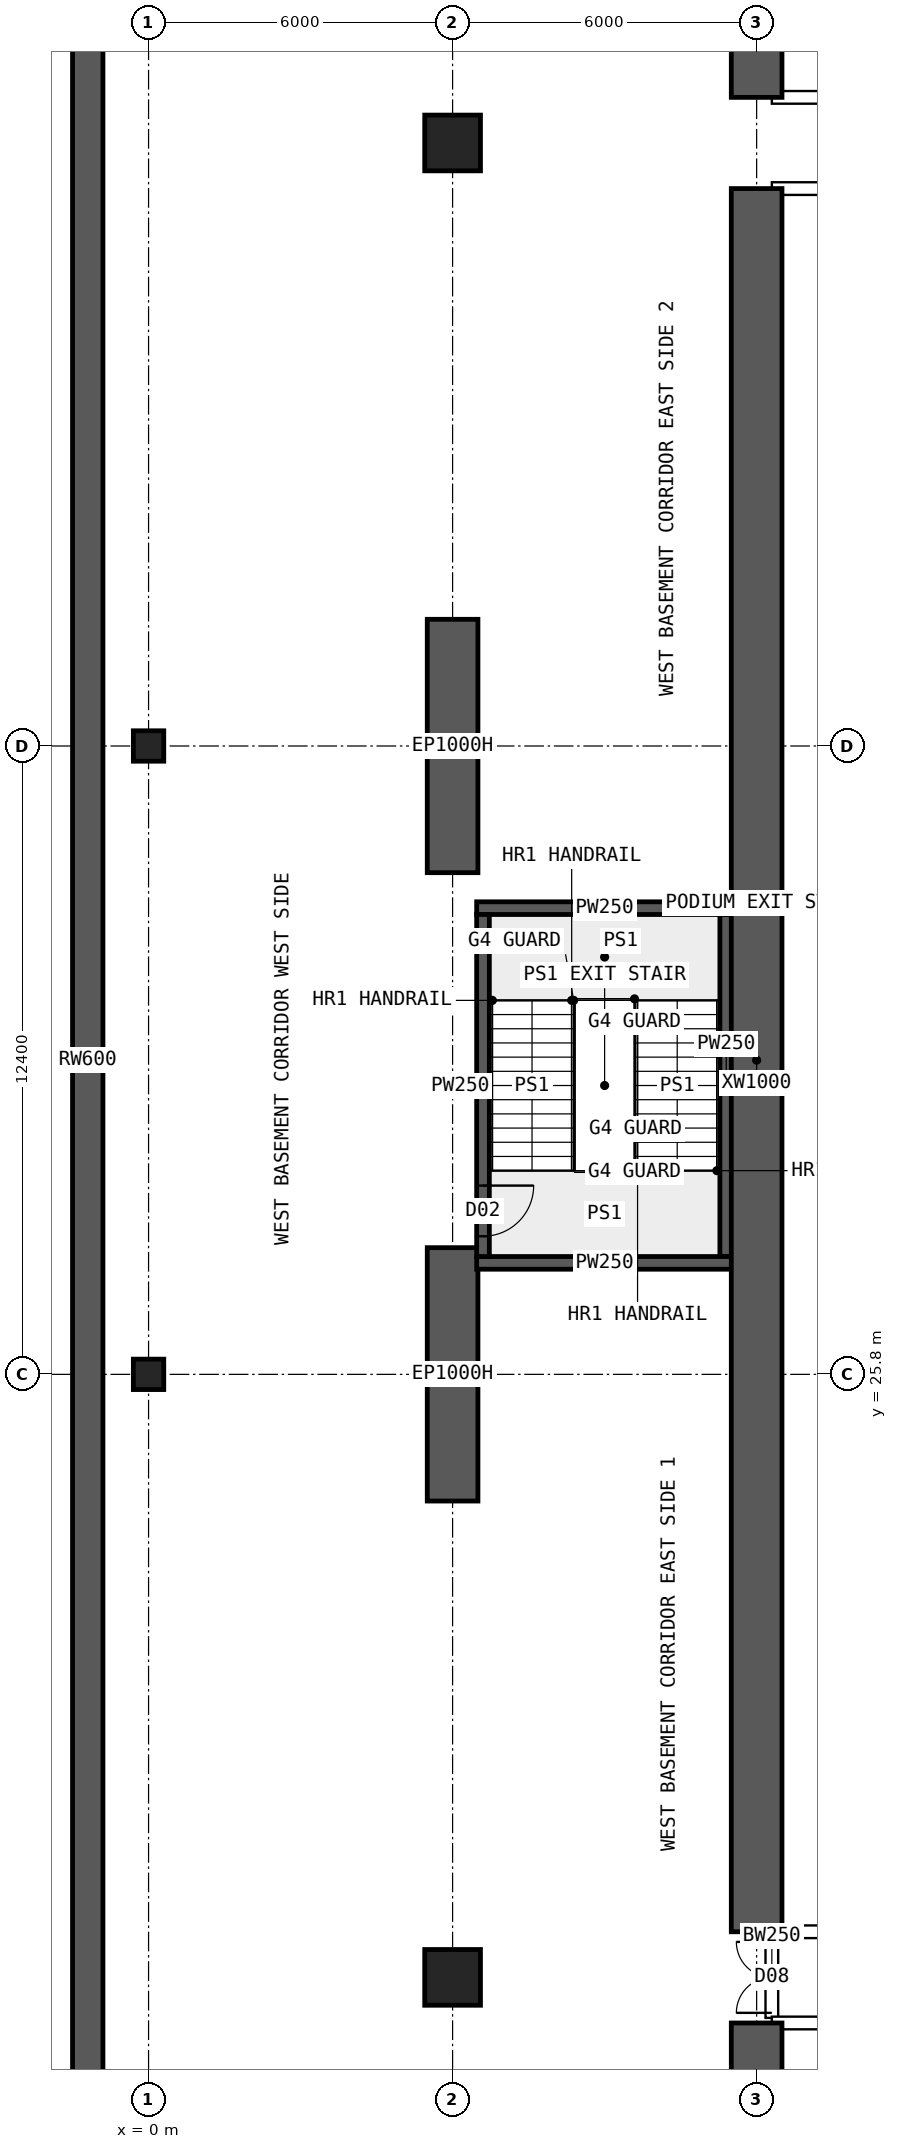
"""IFC4 building model, lengths in metres.
Left out: names, types, materials, properties, quantities, classifications, styles, units other than length and angle.
Written with IfcOpenShell. Run it as: python <this file> out.ifc"""

import sys

from ifc_helpers import new_model, si_unit, direction, frame, frame_2d, origin, origin_2d, place, context, subcontext, project, spatial, polyline, rectangle, hollow_rectangle, outline, extrude, element, fill, save


model = new_model("IFC4")
c1 = context("Model", 3, precision=1e-05, world=origin(), true_north=direction((0.0, 1.0)))
c2 = subcontext(c1, "Body", "Model", "MODEL_VIEW")
j1 = project(units=[si_unit("LENGTHUNIT", "METRE"), si_unit("PLANEANGLEUNIT", "RADIAN")], contexts=[c1])
p1 = place(None, origin())
s1 = spatial("IfcSite", under=j1, at=p1, CompositionType="ELEMENT")
p2 = place(p1, origin())
s2 = spatial("IfcBuilding", under=s1, at=p2, CompositionType="ELEMENT")
p3 = place(p2, frame((0.0, 0.0, -4.5)))
s3 = spatial("IfcBuildingStorey", under=s2, at=p3, CompositionType="ELEMENT", Elevation=-4.5)
for number, where, z_axis, x_axis in (
    (1, (6.0, 23.3, 0.0), (0.0, 0.0, 1.0), (0.0, 1.0, 0.0)),
    (2, (6.0, 35.7, 0.0), (0.0, 0.0, 1.0), (0.0, 1.0, 0.0)),
):
    element("IfcWall", number, at=place(p3, frame(where, z_axis=z_axis, x_axis=x_axis)), inside=s3, PredefinedType="SHEAR", context=c2, shape_type="SweptSolid", body=[
        extrude(rectangle(XDim=5.0, YDim=1.0, at=frame_2d((2.5, 0.0))), origin(), (0.0, 0.0, 1.0), 4.5),
    ])
for number, where, z_axis, x_axis in (
    (3, (6.0, 13.9, 0.0), (0.0, 0.0, 1.0), (1.0, 0.0, 0.0)),
    (4, (6.0, 50.1, 0.0), (0.0, 0.0, 1.0), (1.0, 0.0, 0.0)),
):
    element("IfcColumn", number, at=place(p3, frame(where, z_axis=z_axis, x_axis=x_axis)), inside=s3, PredefinedType="COLUMN", context=c2, shape_type="SweptSolid", body=[
        extrude(hollow_rectangle(XDim=1.1, YDim=1.1, WallThickness=0.11, at=origin_2d()), origin(), (0.0, 0.0, 1.0), 4.5),
    ])
for number, where, z_axis, x_axis in (
    (5, (0.0, 25.8, 0.0), (0.0, 0.0, 1.0), (1.0, 0.0, 0.0)),
    (6, (0.0, 38.2, 0.0), (0.0, 0.0, 1.0), (1.0, 0.0, 0.0)),
):
    element("IfcColumn", number, at=place(p3, frame(where, z_axis=z_axis, x_axis=x_axis)), inside=s3, PredefinedType="COLUMN", context=c2, shape_type="SweptSolid", body=[
        extrude(hollow_rectangle(XDim=0.6, YDim=0.6, WallThickness=0.06, at=origin_2d()), origin(), (0.0, 0.0, 1.0), 4.5),
    ])
p4 = place(p3, frame((6.475, 28.0, 0.0), z_axis=(0.0, 0.0, 1.0), x_axis=(1.0, 0.0, 0.0)))
e7 = element("IfcWall", 7, at=p4, inside=s3, PredefinedType="SHEAR", context=c2, shape_type="SweptSolid", body=[
    extrude(rectangle(XDim=5.05, YDim=0.25, at=frame_2d((2.525, 0.0))), origin(), (0.0, 0.0, 1.0), 4.5),
])
p5 = place(p3, frame((11.4, 28.125, 0.0), z_axis=(0.0, 0.0, 1.0), x_axis=(0.0, 1.0, 0.0)))
e8 = element("IfcWall", 8, at=p5, inside=s3, PredefinedType="SHEAR", context=c2, shape_type="SweptSolid", body=[
    extrude(rectangle(XDim=6.75, YDim=0.25, at=frame_2d((3.375, 0.0))), origin(), (0.0, 0.0, 1.0), 4.5),
])
p6 = place(p3, frame((11.525, 35.0, 0.0), z_axis=(0.0, 0.0, 1.0), x_axis=(-1.0, 0.0, 0.0)))
e9 = element("IfcWall", 9, at=p6, inside=s3, PredefinedType="SHEAR", context=c2, shape_type="SweptSolid", body=[
    extrude(rectangle(XDim=5.05, YDim=0.25, at=frame_2d((2.525, 0.0))), origin(), (0.0, 0.0, 1.0), 4.5),
])
p7 = place(p3, frame((6.6, 34.875, 0.0), z_axis=(0.0, 0.0, 1.0), x_axis=(0.0, -1.0, 0.0)))
e10 = element("IfcWall", 10, at=p7, inside=s3, PredefinedType="SHEAR", context=c2, shape_type="SweptSolid", body=[
    extrude(rectangle(XDim=6.75, YDim=0.25, at=frame_2d((3.375, 0.0))), origin(), (0.0, 0.0, 1.0), 4.5),
])
p8 = place(p7, frame((5.35, 0.0, 0.0)))
e11 = element("IfcOpeningElement", 11, at=p8, cuts=e10, PredefinedType="OPENING", context=c2, shape_type="SweptSolid", body=[
    extrude(rectangle(XDim=1.0, YDim=2.1, at=frame_2d((0.5, 1.05))), frame((0.0, 0.135, 0.0), z_axis=(0.0, -1.0, 0.0), x_axis=(1.0, 0.0, 0.0)), (0.0, 0.0, 1.0), 0.27),
])
for number, where, z_axis, x_axis in (
    (12, (12.0, 7.7, 0.0), (0.0, 0.0, 1.0), (0.0, 1.0, 0.0)),
    (13, (12.0, 51.0, 0.0), (0.0, 0.0, 1.0), (0.0, 1.0, 0.0)),
):
    element("IfcWall", number, at=place(p3, frame(where, z_axis=z_axis, x_axis=x_axis)), inside=s3, PredefinedType="SHEAR", context=c2, shape_type="SweptSolid", body=[
        extrude(rectangle(XDim=5.3, YDim=1.0, at=frame_2d((2.65, 0.0))), origin(), (0.0, 0.0, 1.0), 4.5),
    ])
p9 = place(p3, frame((12.0, 14.8, 0.0), z_axis=(0.0, 0.0, 1.0), x_axis=(0.0, 1.0, 0.0)))
e14 = element("IfcWall", 14, at=p9, inside=s3, PredefinedType="SHEAR", context=c2, shape_type="SweptSolid", body=[
    extrude(rectangle(XDim=34.4, YDim=1.0, at=frame_2d((17.2, 0.0))), origin(), (0.0, 0.0, 1.0), 4.5),
])
p10 = place(p3, frame((-1.2, 59.47, 0.0), z_axis=(0.0, 0.0, 1.0), x_axis=(0.0, -1.0, 0.0)))
e15 = element("IfcWall", 15, at=p10, inside=s3, PredefinedType="SOLIDWALL", context=c2, shape_type="SweptSolid", body=[
    extrude(outline(polyline([(-0.03, -0.3), (54.97, -0.3), (54.911, 0.3), (0.03, 0.3), (-0.03, -0.3)])), origin(), (0.0, 0.0, 1.0), 4.5),
])
for number, where, z_axis, x_axis in (
    (16, (12.3, 13.0, 0.0), (0.0, 0.0, 1.0), (1.0, 0.0, 0.0)),
    (17, (12.3, 51.0, 0.0), (0.0, 0.0, 1.0), (1.0, 0.0, 0.0)),
):
    element("IfcWall", number, at=place(p3, frame(where, z_axis=z_axis, x_axis=x_axis)), inside=s3, PredefinedType="SOLIDWALL", context=c2, shape_type="SweptSolid", body=[
        extrude(rectangle(XDim=5.2, YDim=0.25, at=frame_2d((2.6, 0.0))), origin(), (0.0, 0.0, 1.0), 4.15),
    ])
for number, where, z_axis, x_axis in (
    (18, (12.3, 14.8, 0.0), (0.0, 0.0, 1.0), (1.0, 0.0, 0.0)),
    (19, (12.3, 49.2, 0.0), (0.0, 0.0, 1.0), (1.0, 0.0, 0.0)),
):
    element("IfcWall", number, at=place(p3, frame(where, z_axis=z_axis, x_axis=x_axis)), inside=s3, PredefinedType="SOLIDWALL", context=c2, shape_type="SweptSolid", body=[
        extrude(rectangle(XDim=3.3, YDim=0.25, at=frame_2d((1.65, 0.0))), origin(), (0.0, 0.0, 1.0), 4.15),
    ])
p11 = place(p3, frame((12.3, 13.1, 0.0), z_axis=(0.0, 0.0, 1.0), x_axis=(0.0, 1.0, 0.0)))
e20 = element("IfcWall", 20, at=p11, inside=s3, PredefinedType="SOLIDWALL", context=c2, shape_type="SweptSolid", body=[
    extrude(rectangle(XDim=1.6, YDim=0.25, at=frame_2d((0.8, 0.0))), origin(), (0.0, 0.0, 1.0), 4.15),
])
p12 = place(p11, frame((0.1, 0.0, 0.0)))
e21 = element("IfcOpeningElement", 21, at=p12, cuts=e20, PredefinedType="OPENING", context=c2, shape_type="SweptSolid", body=[
    extrude(rectangle(XDim=1.4, YDim=2.1, at=frame_2d((0.7, 1.05))), frame((0.0, 0.135, 0.0), z_axis=(0.0, -1.0, 0.0), x_axis=(1.0, 0.0, 0.0)), (0.0, 0.0, 1.0), 0.27),
])
p13 = place(p8, origin())
e22 = element("IfcDoor", 22, at=p13, inside=s3, OperationType="SINGLE_SWING_LEFT", PredefinedType="DOOR", context=c2, shape_type="SweptSolid", body=[
    extrude(rectangle(XDim=1.0, YDim=2.1, at=frame_2d((0.5, 1.05))), frame((0.0, 0.025, 0.0), z_axis=(0.0, -1.0, 0.0), x_axis=(1.0, 0.0, 0.0)), (0.0, 0.0, 1.0), 0.05),
])
fill(e11, e22)
p14 = place(p12, origin())
e23 = element("IfcDoor", 23, at=p14, inside=s3, OperationType="DOUBLE_DOOR_SINGLE_SWING", PredefinedType="DOOR", context=c2, shape_type="SweptSolid", body=[
    extrude(rectangle(XDim=1.4, YDim=2.1, at=frame_2d((0.7, 1.05))), frame((0.0, 0.025, 0.0), z_axis=(0.0, -1.0, 0.0), x_axis=(1.0, 0.0, 0.0)), (0.0, 0.0, 1.0), 0.05),
])
fill(e21, e23)
save(model, sys.argv[1])
